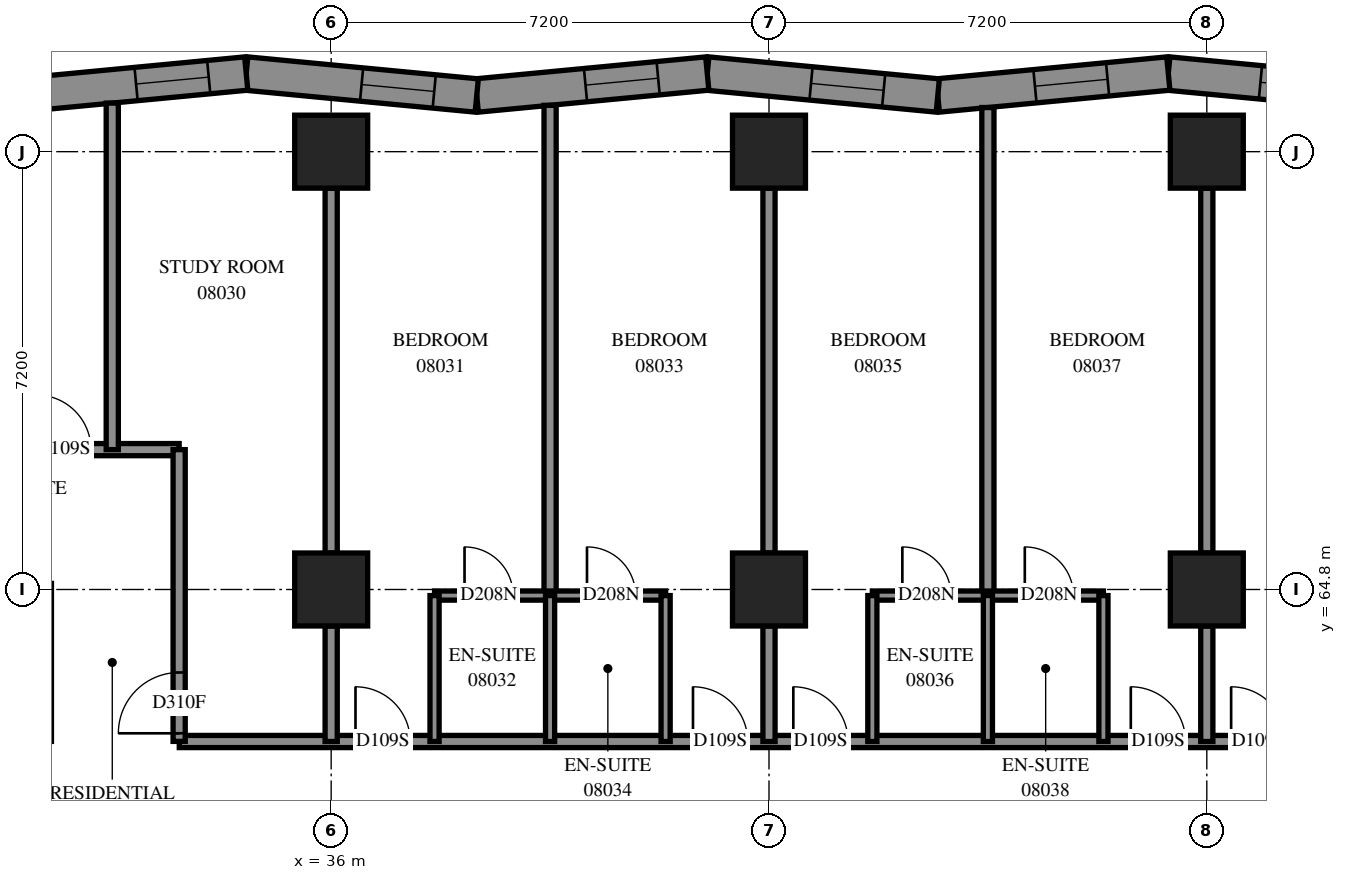
"""IFC4 building model, lengths in metres.
Left out: names, types, materials, properties, quantities, classifications, styles, units other than length and angle.
Written with IfcOpenShell. Run it as: python <this file> out.ifc"""

import sys

from ifc_helpers import new_model, si_unit, direction, frame, frame_2d, origin, origin_2d, place, context, subcontext, project, spatial, polyline, rectangle, outline, extrude, element, fill, save


model = new_model("IFC4")
c1 = context("Model", 3, precision=1e-05, world=origin(), true_north=direction((0.0, 1.0)))
c2 = subcontext(c1, "Body", "Model", "MODEL_VIEW")
j1 = project(units=[si_unit("LENGTHUNIT", "METRE"), si_unit("PLANEANGLEUNIT", "RADIAN")], contexts=[c1])
p1 = place(None, origin())
s1 = spatial("IfcSite", under=j1, at=p1, CompositionType="ELEMENT")
p2 = place(p1, origin())
s2 = spatial("IfcBuilding", under=s1, at=p2, CompositionType="ELEMENT")
p3 = place(p2, frame((0.0, 0.0, 33.8)))
s3 = spatial("IfcBuildingStorey", under=s2, at=p3, CompositionType="ELEMENT", Elevation=33.8)
for number, where, z_axis, x_axis in (
    (1, (36.0, 64.8, 0.0), (0.0, 0.0, 1.0), (1.0, 0.0, 0.0)),
    (2, (36.0, 72.0, 0.0), (0.0, 0.0, 1.0), (1.0, 0.0, 0.0)),
    (3, (43.2, 64.8, 0.0), (0.0, 0.0, 1.0), (1.0, 0.0, 0.0)),
    (4, (43.2, 72.0, 0.0), (0.0, 0.0, 1.0), (1.0, 0.0, 0.0)),
    (5, (50.4, 64.8, 0.0), (0.0, 0.0, 1.0), (1.0, 0.0, 0.0)),
    (6, (50.4, 72.0, 0.0), (0.0, 0.0, 1.0), (1.0, 0.0, 0.0)),
):
    element("IfcColumn", number, at=place(p3, frame(where, z_axis=z_axis, x_axis=x_axis)), inside=s3, PredefinedType="COLUMN", context=c2, shape_type="SweptSolid", body=[
        extrude(rectangle(XDim=1.2, YDim=1.2, at=origin_2d()), origin(), (0.0, 0.0, 1.0), 3.1),
    ])
p4 = place(p3, frame((53.558, 72.924, 0.0), z_axis=(0.0, 0.0, 1.0), x_axis=(-0.9954966527, 0.0947967005, 0.0)))
e7 = element("IfcWall", 7, at=p4, inside=s3, PredefinedType="SOLIDWALL", context=c2, shape_type="SweptSolid", body=[
    extrude(outline(polyline([(0.026, -0.275), (3.834, -0.275), (3.782, 0.275), (-0.026, 0.275), (0.026, -0.275)])), origin(), (0.0, 0.0, 1.0), 3.1),
])
p5 = place(p4, frame((1.086, 0.0, 0.5)))
e8 = element("IfcOpeningElement", 8, at=p5, cuts=e7, PredefinedType="OPENING", context=c2, shape_type="SweptSolid", body=[
    extrude(rectangle(XDim=1.2, YDim=2.45, at=frame_2d((0.6, 1.225))), frame((0.0, 0.285, 0.0), z_axis=(0.0, -1.0, 0.0), x_axis=(1.0, 0.0, 0.0)), (0.0, 0.0, 1.0), 0.57),
])
p6 = place(p3, frame((49.767, 73.285, 0.0), z_axis=(0.0, 0.0, 1.0), x_axis=(-0.9954966527, -0.0947967005, 0.0)))
e9 = element("IfcWall", 9, at=p6, inside=s3, PredefinedType="SOLIDWALL", context=c2, shape_type="SweptSolid", body=[
    extrude(outline(polyline([(-0.026, -0.275), (3.782, -0.275), (3.834, 0.275), (0.026, 0.275), (-0.026, -0.275)])), origin(), (0.0, 0.0, 1.0), 3.1),
])
p7 = place(p6, frame((1.003, 0.0, 0.5)))
e10 = element("IfcOpeningElement", 10, at=p7, cuts=e9, PredefinedType="OPENING", context=c2, shape_type="SweptSolid", body=[
    extrude(rectangle(XDim=1.2, YDim=2.45, at=frame_2d((0.6, 1.225))), frame((0.0, 0.285, 0.0), z_axis=(0.0, -1.0, 0.0), x_axis=(1.0, 0.0, 0.0)), (0.0, 0.0, 1.0), 0.57),
])
p8 = place(p3, frame((45.976, 72.924, 0.0), z_axis=(0.0, 0.0, 1.0), x_axis=(-0.9954966527, 0.0947967005, 0.0)))
e11 = element("IfcWall", 11, at=p8, inside=s3, PredefinedType="SOLIDWALL", context=c2, shape_type="SweptSolid", body=[
    extrude(outline(polyline([(0.026, -0.275), (3.834, -0.275), (3.782, 0.275), (-0.026, 0.275), (0.026, -0.275)])), origin(), (0.0, 0.0, 1.0), 3.1),
])
p9 = place(p8, frame((0.894, 0.0, 0.5)))
e12 = element("IfcOpeningElement", 12, at=p9, cuts=e11, PredefinedType="OPENING", context=c2, shape_type="SweptSolid", body=[
    extrude(rectangle(XDim=1.2, YDim=2.45, at=frame_2d((0.6, 1.225))), frame((0.0, 0.285, 0.0), z_axis=(0.0, -1.0, 0.0), x_axis=(1.0, 0.0, 0.0)), (0.0, 0.0, 1.0), 0.57),
])
p10 = place(p3, frame((42.185, 73.285, 0.0), z_axis=(0.0, 0.0, 1.0), x_axis=(-0.9954968887, -0.0947942225, 0.0)))
e13 = element("IfcWall", 13, at=p10, inside=s3, PredefinedType="SOLIDWALL", context=c2, shape_type="SweptSolid", body=[
    extrude(outline(polyline([(-0.026, -0.275), (3.782, -0.275), (3.834, 0.275), (0.026, 0.275), (-0.026, -0.275)])), origin(), (0.0, 0.0, 1.0), 3.1),
])
p11 = place(p10, frame((0.811, 0.0, 0.5)))
e14 = element("IfcOpeningElement", 14, at=p11, cuts=e13, PredefinedType="OPENING", context=c2, shape_type="SweptSolid", body=[
    extrude(rectangle(XDim=1.2, YDim=2.45, at=frame_2d((0.6, 1.225))), frame((0.0, 0.285, 0.0), z_axis=(0.0, -1.0, 0.0), x_axis=(1.0, 0.0, 0.0)), (0.0, 0.0, 1.0), 0.57),
])
p12 = place(p3, frame((38.394, 72.924, 0.0), z_axis=(0.0, 0.0, 1.0), x_axis=(-0.9954966527, 0.0947967005, 0.0)))
e15 = element("IfcWall", 15, at=p12, inside=s3, PredefinedType="SOLIDWALL", context=c2, shape_type="SweptSolid", body=[
    extrude(outline(polyline([(0.026, -0.275), (3.834, -0.275), (3.782, 0.275), (-0.026, 0.275), (0.026, -0.275)])), origin(), (0.0, 0.0, 1.0), 3.1),
])
p13 = place(p12, frame((0.702, 0.0, 0.5)))
e16 = element("IfcOpeningElement", 16, at=p13, cuts=e15, PredefinedType="OPENING", context=c2, shape_type="SweptSolid", body=[
    extrude(rectangle(XDim=1.2, YDim=2.45, at=frame_2d((0.6, 1.225))), frame((0.0, 0.285, 0.0), z_axis=(0.0, -1.0, 0.0), x_axis=(1.0, 0.0, 0.0)), (0.0, 0.0, 1.0), 0.57),
])
p14 = place(p3, frame((34.603, 73.285, 0.0), z_axis=(0.0, 0.0, 1.0), x_axis=(-0.9954966527, -0.0947967005, 0.0)))
e17 = element("IfcWall", 17, at=p14, inside=s3, PredefinedType="SOLIDWALL", context=c2, shape_type="SweptSolid", body=[
    extrude(outline(polyline([(-0.026, -0.275), (3.782, -0.275), (3.834, 0.275), (0.026, 0.275), (-0.026, -0.275)])), origin(), (0.0, 0.0, 1.0), 3.1),
])
p15 = place(p14, frame((0.62, 0.0, 0.5)))
e18 = element("IfcOpeningElement", 18, at=p15, cuts=e17, PredefinedType="OPENING", context=c2, shape_type="SweptSolid", body=[
    extrude(rectangle(XDim=1.2, YDim=2.45, at=frame_2d((0.6, 1.225))), frame((0.0, 0.285, 0.0), z_axis=(0.0, -1.0, 0.0), x_axis=(1.0, 0.0, 0.0)), (0.0, 0.0, 1.0), 0.57),
])
p16 = place(p3, frame((33.502, 62.3, 0.0), z_axis=(0.0, 0.0, 1.0), x_axis=(1.0, 0.0, 0.0)))
e19 = element("IfcWall", 19, at=p16, inside=s3, PredefinedType="PARTITIONING", context=c2, shape_type="SweptSolid", body=[
    extrude(rectangle(XDim=20.998, YDim=0.2, at=frame_2d((10.499, 0.0))), origin(), (0.0, 0.0, 1.0), 3.1),
])
p17 = place(p16, frame((2.898, 0.0, 0.0)))
e20 = element("IfcOpeningElement", 20, at=p17, cuts=e19, PredefinedType="OPENING", context=c2, shape_type="SweptSolid", body=[
    extrude(rectangle(XDim=0.9, YDim=2.1, at=frame_2d((0.45, 1.05))), frame((0.0, 0.11, 0.0), z_axis=(0.0, -1.0, 0.0), x_axis=(1.0, 0.0, 0.0)), (0.0, 0.0, 1.0), 0.22),
])
p18 = place(p16, frame((8.448, 0.0, 0.0)))
e21 = element("IfcOpeningElement", 21, at=p18, cuts=e19, PredefinedType="OPENING", context=c2, shape_type="SweptSolid", body=[
    extrude(rectangle(XDim=0.9, YDim=2.1, at=frame_2d((0.45, 1.05))), frame((0.0, 0.11, 0.0), z_axis=(0.0, -1.0, 0.0), x_axis=(1.0, 0.0, 0.0)), (0.0, 0.0, 1.0), 0.22),
])
p19 = place(p16, frame((10.098, 0.0, 0.0)))
e22 = element("IfcOpeningElement", 22, at=p19, cuts=e19, PredefinedType="OPENING", context=c2, shape_type="SweptSolid", body=[
    extrude(rectangle(XDim=0.9, YDim=2.1, at=frame_2d((0.45, 1.05))), frame((0.0, 0.11, 0.0), z_axis=(0.0, -1.0, 0.0), x_axis=(1.0, 0.0, 0.0)), (0.0, 0.0, 1.0), 0.22),
])
p20 = place(p16, frame((15.648, 0.0, 0.0)))
e23 = element("IfcOpeningElement", 23, at=p20, cuts=e19, PredefinedType="OPENING", context=c2, shape_type="SweptSolid", body=[
    extrude(rectangle(XDim=0.9, YDim=2.1, at=frame_2d((0.45, 1.05))), frame((0.0, 0.11, 0.0), z_axis=(0.0, -1.0, 0.0), x_axis=(1.0, 0.0, 0.0)), (0.0, 0.0, 1.0), 0.22),
])
p21 = place(p16, frame((17.298, 0.0, 0.0)))
e24 = element("IfcOpeningElement", 24, at=p21, cuts=e19, PredefinedType="OPENING", context=c2, shape_type="SweptSolid", body=[
    extrude(rectangle(XDim=0.9, YDim=2.1, at=frame_2d((0.45, 1.05))), frame((0.0, 0.11, 0.0), z_axis=(0.0, -1.0, 0.0), x_axis=(1.0, 0.0, 0.0)), (0.0, 0.0, 1.0), 0.22),
])
p22 = place(p3, frame((21.602, 67.1, 0.0), z_axis=(0.0, 0.0, 1.0), x_axis=(1.0, 0.0, 0.0)))
e25 = element("IfcWall", 25, at=p22, inside=s3, PredefinedType="PARTITIONING", context=c2, shape_type="SweptSolid", body=[
    extrude(rectangle(XDim=11.898, YDim=0.2, at=frame_2d((5.949, 0.0))), origin(), (0.0, 0.0, 1.0), 3.1),
])
p23 = place(p22, frame((1.798, 0.0, 0.0)))
e26 = element("IfcOpeningElement", 26, at=p23, cuts=e25, PredefinedType="OPENING", context=c2, shape_type="SweptSolid", body=[
    extrude(rectangle(XDim=1.0, YDim=2.1, at=frame_2d((0.5, 1.05))), frame((0.0, 0.11, 0.0), z_axis=(0.0, -1.0, 0.0), x_axis=(1.0, 0.0, 0.0)), (0.0, 0.0, 1.0), 0.22),
])
p24 = place(p22, frame((3.998, 0.0, 0.0)))
e27 = element("IfcOpeningElement", 27, at=p24, cuts=e25, PredefinedType="OPENING", context=c2, shape_type="SweptSolid", body=[
    extrude(rectangle(XDim=0.9, YDim=2.1, at=frame_2d((0.45, 1.05))), frame((0.0, 0.11, 0.0), z_axis=(0.0, -1.0, 0.0), x_axis=(1.0, 0.0, 0.0)), (0.0, 0.0, 1.0), 0.22),
])
p25 = place(p22, frame((9.548, 0.0, 0.0)))
e28 = element("IfcOpeningElement", 28, at=p25, cuts=e25, PredefinedType="OPENING", context=c2, shape_type="SweptSolid", body=[
    extrude(rectangle(XDim=0.9, YDim=2.1, at=frame_2d((0.45, 1.05))), frame((0.0, 0.11, 0.0), z_axis=(0.0, -1.0, 0.0), x_axis=(1.0, 0.0, 0.0)), (0.0, 0.0, 1.0), 0.22),
])
p26 = place(p3, frame((39.6, 64.7, 0.0), z_axis=(0.0, 0.0, 1.0), x_axis=(0.0, 1.0, 0.0)))
e29 = element("IfcWall", 29, at=p26, inside=s3, PredefinedType="PARTITIONING", context=c2, shape_type="SweptSolid", body=[
    extrude(rectangle(XDim=8.062, YDim=0.2, at=frame_2d((4.031, 0.0))), origin(), (0.0, 0.0, 1.0), 3.1),
])
p27 = place(p3, frame((46.8, 64.7, 0.0), z_axis=(0.0, 0.0, 1.0), x_axis=(0.0, 1.0, 0.0)))
e30 = element("IfcWall", 30, at=p27, inside=s3, PredefinedType="PARTITIONING", context=c2, shape_type="SweptSolid", body=[
    extrude(rectangle(XDim=8.026, YDim=0.2, at=frame_2d((4.013, 0.0))), origin(), (0.0, 0.0, 1.0), 3.1),
])
for number, where, z_axis, x_axis in (
    (31, (36.0, 65.4, 0.0), (0.0, 0.0, 1.0), (0.0, 1.0, 0.0)),
    (32, (43.2, 65.4, 0.0), (0.0, 0.0, 1.0), (0.0, 1.0, 0.0)),
    (33, (50.4, 65.4, 0.0), (0.0, 0.0, 1.0), (0.0, 1.0, 0.0)),
):
    element("IfcWall", number, at=place(p3, frame(where, z_axis=z_axis, x_axis=x_axis)), inside=s3, PredefinedType="PARTITIONING", context=c2, shape_type="SweptSolid", body=[
        extrude(rectangle(XDim=6.0, YDim=0.2, at=frame_2d((3.0, 0.0))), origin(), (0.0, 0.0, 1.0), 3.1),
    ])
p28 = place(p3, frame((32.4, 67.1, 0.0), z_axis=(0.0, 0.0, 1.0), x_axis=(0.0, 1.0, 0.0)))
e34 = element("IfcWall", 34, at=p28, inside=s3, PredefinedType="PARTITIONING", context=c2, shape_type="SweptSolid", body=[
    extrude(rectangle(XDim=5.699, YDim=0.2, at=frame_2d((2.849, 0.0))), origin(), (0.0, 0.0, 1.0), 3.1),
])
p29 = place(p3, frame((33.5, 62.302, 0.0), z_axis=(0.0, 0.0, 1.0), x_axis=(0.0, 1.0, 0.0)))
e35 = element("IfcWall", 35, at=p29, inside=s3, PredefinedType="PARTITIONING", context=c2, shape_type="SweptSolid", body=[
    extrude(rectangle(XDim=4.798, YDim=0.2, at=frame_2d((2.399, 0.0))), origin(), (0.0, 0.0, 1.0), 3.1),
])
p30 = place(p29, frame((0.133, 0.0, 0.0)))
e36 = element("IfcOpeningElement", 36, at=p30, cuts=e35, PredefinedType="OPENING", context=c2, shape_type="SweptSolid", body=[
    extrude(rectangle(XDim=1.0, YDim=2.1, at=frame_2d((0.5, 1.05))), frame((0.0, 0.11, 0.0), z_axis=(0.0, -1.0, 0.0), x_axis=(1.0, 0.0, 0.0)), (0.0, 0.0, 1.0), 0.22),
])
p31 = place(p3, frame((44.9, 64.7, 0.0), z_axis=(0.0, 0.0, 1.0), x_axis=(1.0, 0.0, 0.0)))
e37 = element("IfcWall", 37, at=p31, inside=s3, PredefinedType="PARTITIONING", context=c2, shape_type="SweptSolid", body=[
    extrude(rectangle(XDim=3.8, YDim=0.15, at=frame_2d((1.9, 0.0))), origin(), (0.0, 0.0, 1.0), 3.1),
])
p32 = place(p31, frame((0.493, 0.0, 0.0)))
e38 = element("IfcOpeningElement", 38, at=p32, cuts=e37, PredefinedType="OPENING", context=c2, shape_type="SweptSolid", body=[
    extrude(rectangle(XDim=0.8, YDim=2.1, at=frame_2d((0.4, 1.05))), frame((0.0, 0.085, 0.0), z_axis=(0.0, -1.0, 0.0), x_axis=(1.0, 0.0, 0.0)), (0.0, 0.0, 1.0), 0.17),
])
p33 = place(p31, frame((2.507, 0.0, 0.0)))
e39 = element("IfcOpeningElement", 39, at=p33, cuts=e37, PredefinedType="OPENING", context=c2, shape_type="SweptSolid", body=[
    extrude(rectangle(XDim=0.8, YDim=2.1, at=frame_2d((0.4, 1.05))), frame((0.0, 0.085, 0.0), z_axis=(0.0, -1.0, 0.0), x_axis=(1.0, 0.0, 0.0)), (0.0, 0.0, 1.0), 0.17),
])
p34 = place(p3, frame((37.7, 64.7, 0.0), z_axis=(0.0, 0.0, 1.0), x_axis=(1.0, 0.0, 0.0)))
e40 = element("IfcWall", 40, at=p34, inside=s3, PredefinedType="PARTITIONING", context=c2, shape_type="SweptSolid", body=[
    extrude(rectangle(XDim=3.8, YDim=0.15, at=frame_2d((1.9, 0.0))), origin(), (0.0, 0.0, 1.0), 3.1),
])
p35 = place(p34, frame((0.493, 0.0, 0.0)))
e41 = element("IfcOpeningElement", 41, at=p35, cuts=e40, PredefinedType="OPENING", context=c2, shape_type="SweptSolid", body=[
    extrude(rectangle(XDim=0.8, YDim=2.1, at=frame_2d((0.4, 1.05))), frame((0.0, 0.085, 0.0), z_axis=(0.0, -1.0, 0.0), x_axis=(1.0, 0.0, 0.0)), (0.0, 0.0, 1.0), 0.17),
])
p36 = place(p34, frame((2.507, 0.0, 0.0)))
e42 = element("IfcOpeningElement", 42, at=p36, cuts=e40, PredefinedType="OPENING", context=c2, shape_type="SweptSolid", body=[
    extrude(rectangle(XDim=0.8, YDim=2.1, at=frame_2d((0.4, 1.05))), frame((0.0, 0.085, 0.0), z_axis=(0.0, -1.0, 0.0), x_axis=(1.0, 0.0, 0.0)), (0.0, 0.0, 1.0), 0.17),
])
for number, where, z_axis, x_axis in (
    (43, (37.7, 62.3, 0.0), (0.0, 0.0, 1.0), (0.0, 1.0, 0.0)),
    (44, (39.6, 62.3, 0.0), (0.0, 0.0, 1.0), (0.0, 1.0, 0.0)),
    (45, (41.5, 62.3, 0.0), (0.0, 0.0, 1.0), (0.0, 1.0, 0.0)),
    (46, (44.9, 62.3, 0.0), (0.0, 0.0, 1.0), (0.0, 1.0, 0.0)),
    (47, (46.8, 62.3, 0.0), (0.0, 0.0, 1.0), (0.0, 1.0, 0.0)),
    (48, (48.7, 62.3, 0.0), (0.0, 0.0, 1.0), (0.0, 1.0, 0.0)),
):
    element("IfcWall", number, at=place(p3, frame(where, z_axis=z_axis, x_axis=x_axis)), inside=s3, PredefinedType="PARTITIONING", context=c2, shape_type="SweptSolid", body=[
        extrude(rectangle(XDim=2.4, YDim=0.15, at=frame_2d((1.2, 0.0))), origin(), (0.0, 0.0, 1.0), 3.1),
    ])
for number, where, z_axis, x_axis in (
    (49, (36.0, 62.3, 0.0), (0.0, 0.0, 1.0), (0.0, 1.0, 0.0)),
    (50, (43.2, 62.3, 0.0), (0.0, 0.0, 1.0), (0.0, 1.0, 0.0)),
    (51, (50.4, 62.3, 0.0), (0.0, 0.0, 1.0), (0.0, 1.0, 0.0)),
):
    element("IfcWall", number, at=place(p3, frame(where, z_axis=z_axis, x_axis=x_axis)), inside=s3, PredefinedType="PARTITIONING", context=c2, shape_type="SweptSolid", body=[
        extrude(rectangle(XDim=1.9, YDim=0.2, at=frame_2d((0.95, 0.0))), origin(), (0.0, 0.0, 1.0), 3.1),
    ])
p37 = place(p5, origin())
e52 = element("IfcWindow", 52, at=p37, inside=s3, PartitioningType="SINGLE_PANEL", PredefinedType="WINDOW", context=c2, shape_type="SweptSolid", body=[
    extrude(rectangle(XDim=1.2, YDim=2.45, at=frame_2d((0.6, 1.225))), frame((0.0, 0.155, 0.0), z_axis=(0.0, -1.0, 0.0), x_axis=(1.0, 0.0, 0.0)), (0.0, 0.0, 1.0), 0.06),
])
fill(e8, e52)
p38 = place(p7, origin())
e53 = element("IfcWindow", 53, at=p38, inside=s3, PartitioningType="SINGLE_PANEL", PredefinedType="WINDOW", context=c2, shape_type="SweptSolid", body=[
    extrude(rectangle(XDim=1.2, YDim=2.45, at=frame_2d((0.6, 1.225))), frame((0.0, 0.155, 0.0), z_axis=(0.0, -1.0, 0.0), x_axis=(1.0, 0.0, 0.0)), (0.0, 0.0, 1.0), 0.06),
])
fill(e10, e53)
p39 = place(p9, origin())
e54 = element("IfcWindow", 54, at=p39, inside=s3, PartitioningType="SINGLE_PANEL", PredefinedType="WINDOW", context=c2, shape_type="SweptSolid", body=[
    extrude(rectangle(XDim=1.2, YDim=2.45, at=frame_2d((0.6, 1.225))), frame((0.0, 0.155, 0.0), z_axis=(0.0, -1.0, 0.0), x_axis=(1.0, 0.0, 0.0)), (0.0, 0.0, 1.0), 0.06),
])
fill(e12, e54)
p40 = place(p11, origin())
e55 = element("IfcWindow", 55, at=p40, inside=s3, PartitioningType="SINGLE_PANEL", PredefinedType="WINDOW", context=c2, shape_type="SweptSolid", body=[
    extrude(rectangle(XDim=1.2, YDim=2.45, at=frame_2d((0.6, 1.225))), frame((0.0, 0.155, 0.0), z_axis=(0.0, -1.0, 0.0), x_axis=(1.0, 0.0, 0.0)), (0.0, 0.0, 1.0), 0.06),
])
fill(e14, e55)
p41 = place(p13, origin())
e56 = element("IfcWindow", 56, at=p41, inside=s3, PartitioningType="SINGLE_PANEL", PredefinedType="WINDOW", context=c2, shape_type="SweptSolid", body=[
    extrude(rectangle(XDim=1.2, YDim=2.45, at=frame_2d((0.6, 1.225))), frame((0.0, 0.155, 0.0), z_axis=(0.0, -1.0, 0.0), x_axis=(1.0, 0.0, 0.0)), (0.0, 0.0, 1.0), 0.06),
])
fill(e16, e56)
p42 = place(p15, origin())
e57 = element("IfcWindow", 57, at=p42, inside=s3, PartitioningType="SINGLE_PANEL", PredefinedType="WINDOW", context=c2, shape_type="SweptSolid", body=[
    extrude(rectangle(XDim=1.2, YDim=2.45, at=frame_2d((0.6, 1.225))), frame((0.0, 0.155, 0.0), z_axis=(0.0, -1.0, 0.0), x_axis=(1.0, 0.0, 0.0)), (0.0, 0.0, 1.0), 0.06),
])
fill(e18, e57)
p43 = place(p25, origin())
e58 = element("IfcDoor", 58, at=p43, inside=s3, OperationType="SINGLE_SWING_RIGHT", PredefinedType="DOOR", context=c2, shape_type="SweptSolid", body=[
    extrude(rectangle(XDim=0.9, YDim=2.1, at=frame_2d((0.45, 1.05))), frame((0.0, 0.025, 0.0), z_axis=(0.0, -1.0, 0.0), x_axis=(1.0, 0.0, 0.0)), (0.0, 0.0, 1.0), 0.05),
])
fill(e28, e58)
p44 = place(p30, origin())
e59 = element("IfcDoor", 59, at=p44, inside=s3, OperationType="SINGLE_SWING_LEFT", PredefinedType="DOOR", context=c2, shape_type="SweptSolid", body=[
    extrude(rectangle(XDim=1.0, YDim=2.1, at=frame_2d((0.5, 1.05))), frame((0.0, 0.025, 0.0), z_axis=(0.0, -1.0, 0.0), x_axis=(1.0, 0.0, 0.0)), (0.0, 0.0, 1.0), 0.05),
])
fill(e36, e59)
p45 = place(p17, origin())
e60 = element("IfcDoor", 60, at=p45, inside=s3, OperationType="SINGLE_SWING_RIGHT", PredefinedType="DOOR", context=c2, shape_type="SweptSolid", body=[
    extrude(rectangle(XDim=0.9, YDim=2.1, at=frame_2d((0.45, 1.05))), frame((0.0, 0.025, 0.0), z_axis=(0.0, -1.0, 0.0), x_axis=(1.0, 0.0, 0.0)), (0.0, 0.0, 1.0), 0.05),
])
fill(e20, e60)
p46 = place(p35, origin())
e61 = element("IfcDoor", 61, at=p46, inside=s3, OperationType="SINGLE_SWING_RIGHT", PredefinedType="DOOR", context=c2, shape_type="SweptSolid", body=[
    extrude(rectangle(XDim=0.8, YDim=2.1, at=frame_2d((0.4, 1.05))), frame((0.0, 0.025, 0.0), z_axis=(0.0, -1.0, 0.0), x_axis=(1.0, 0.0, 0.0)), (0.0, 0.0, 1.0), 0.05),
])
fill(e41, e61)
p47 = place(p18, origin())
e62 = element("IfcDoor", 62, at=p47, inside=s3, OperationType="SINGLE_SWING_LEFT", PredefinedType="DOOR", context=c2, shape_type="SweptSolid", body=[
    extrude(rectangle(XDim=0.9, YDim=2.1, at=frame_2d((0.45, 1.05))), frame((0.0, 0.025, 0.0), z_axis=(0.0, -1.0, 0.0), x_axis=(1.0, 0.0, 0.0)), (0.0, 0.0, 1.0), 0.05),
])
fill(e21, e62)
p48 = place(p36, origin())
e63 = element("IfcDoor", 63, at=p48, inside=s3, OperationType="SINGLE_SWING_RIGHT", PredefinedType="DOOR", context=c2, shape_type="SweptSolid", body=[
    extrude(rectangle(XDim=0.8, YDim=2.1, at=frame_2d((0.4, 1.05))), frame((0.0, 0.025, 0.0), z_axis=(0.0, -1.0, 0.0), x_axis=(1.0, 0.0, 0.0)), (0.0, 0.0, 1.0), 0.05),
])
fill(e42, e63)
p49 = place(p19, origin())
e64 = element("IfcDoor", 64, at=p49, inside=s3, OperationType="SINGLE_SWING_RIGHT", PredefinedType="DOOR", context=c2, shape_type="SweptSolid", body=[
    extrude(rectangle(XDim=0.9, YDim=2.1, at=frame_2d((0.45, 1.05))), frame((0.0, 0.025, 0.0), z_axis=(0.0, -1.0, 0.0), x_axis=(1.0, 0.0, 0.0)), (0.0, 0.0, 1.0), 0.05),
])
fill(e22, e64)
p50 = place(p32, origin())
e65 = element("IfcDoor", 65, at=p50, inside=s3, OperationType="SINGLE_SWING_RIGHT", PredefinedType="DOOR", context=c2, shape_type="SweptSolid", body=[
    extrude(rectangle(XDim=0.8, YDim=2.1, at=frame_2d((0.4, 1.05))), frame((0.0, 0.025, 0.0), z_axis=(0.0, -1.0, 0.0), x_axis=(1.0, 0.0, 0.0)), (0.0, 0.0, 1.0), 0.05),
])
fill(e38, e65)
p51 = place(p20, origin())
e66 = element("IfcDoor", 66, at=p51, inside=s3, OperationType="SINGLE_SWING_LEFT", PredefinedType="DOOR", context=c2, shape_type="SweptSolid", body=[
    extrude(rectangle(XDim=0.9, YDim=2.1, at=frame_2d((0.45, 1.05))), frame((0.0, 0.025, 0.0), z_axis=(0.0, -1.0, 0.0), x_axis=(1.0, 0.0, 0.0)), (0.0, 0.0, 1.0), 0.05),
])
fill(e23, e66)
p52 = place(p33, origin())
e67 = element("IfcDoor", 67, at=p52, inside=s3, OperationType="SINGLE_SWING_RIGHT", PredefinedType="DOOR", context=c2, shape_type="SweptSolid", body=[
    extrude(rectangle(XDim=0.8, YDim=2.1, at=frame_2d((0.4, 1.05))), frame((0.0, 0.025, 0.0), z_axis=(0.0, -1.0, 0.0), x_axis=(1.0, 0.0, 0.0)), (0.0, 0.0, 1.0), 0.05),
])
fill(e39, e67)
p53 = place(p21, origin())
e68 = element("IfcDoor", 68, at=p53, inside=s3, OperationType="SINGLE_SWING_RIGHT", PredefinedType="DOOR", context=c2, shape_type="SweptSolid", body=[
    extrude(rectangle(XDim=0.9, YDim=2.1, at=frame_2d((0.45, 1.05))), frame((0.0, 0.025, 0.0), z_axis=(0.0, -1.0, 0.0), x_axis=(1.0, 0.0, 0.0)), (0.0, 0.0, 1.0), 0.05),
])
fill(e24, e68)
save(model, sys.argv[1])
